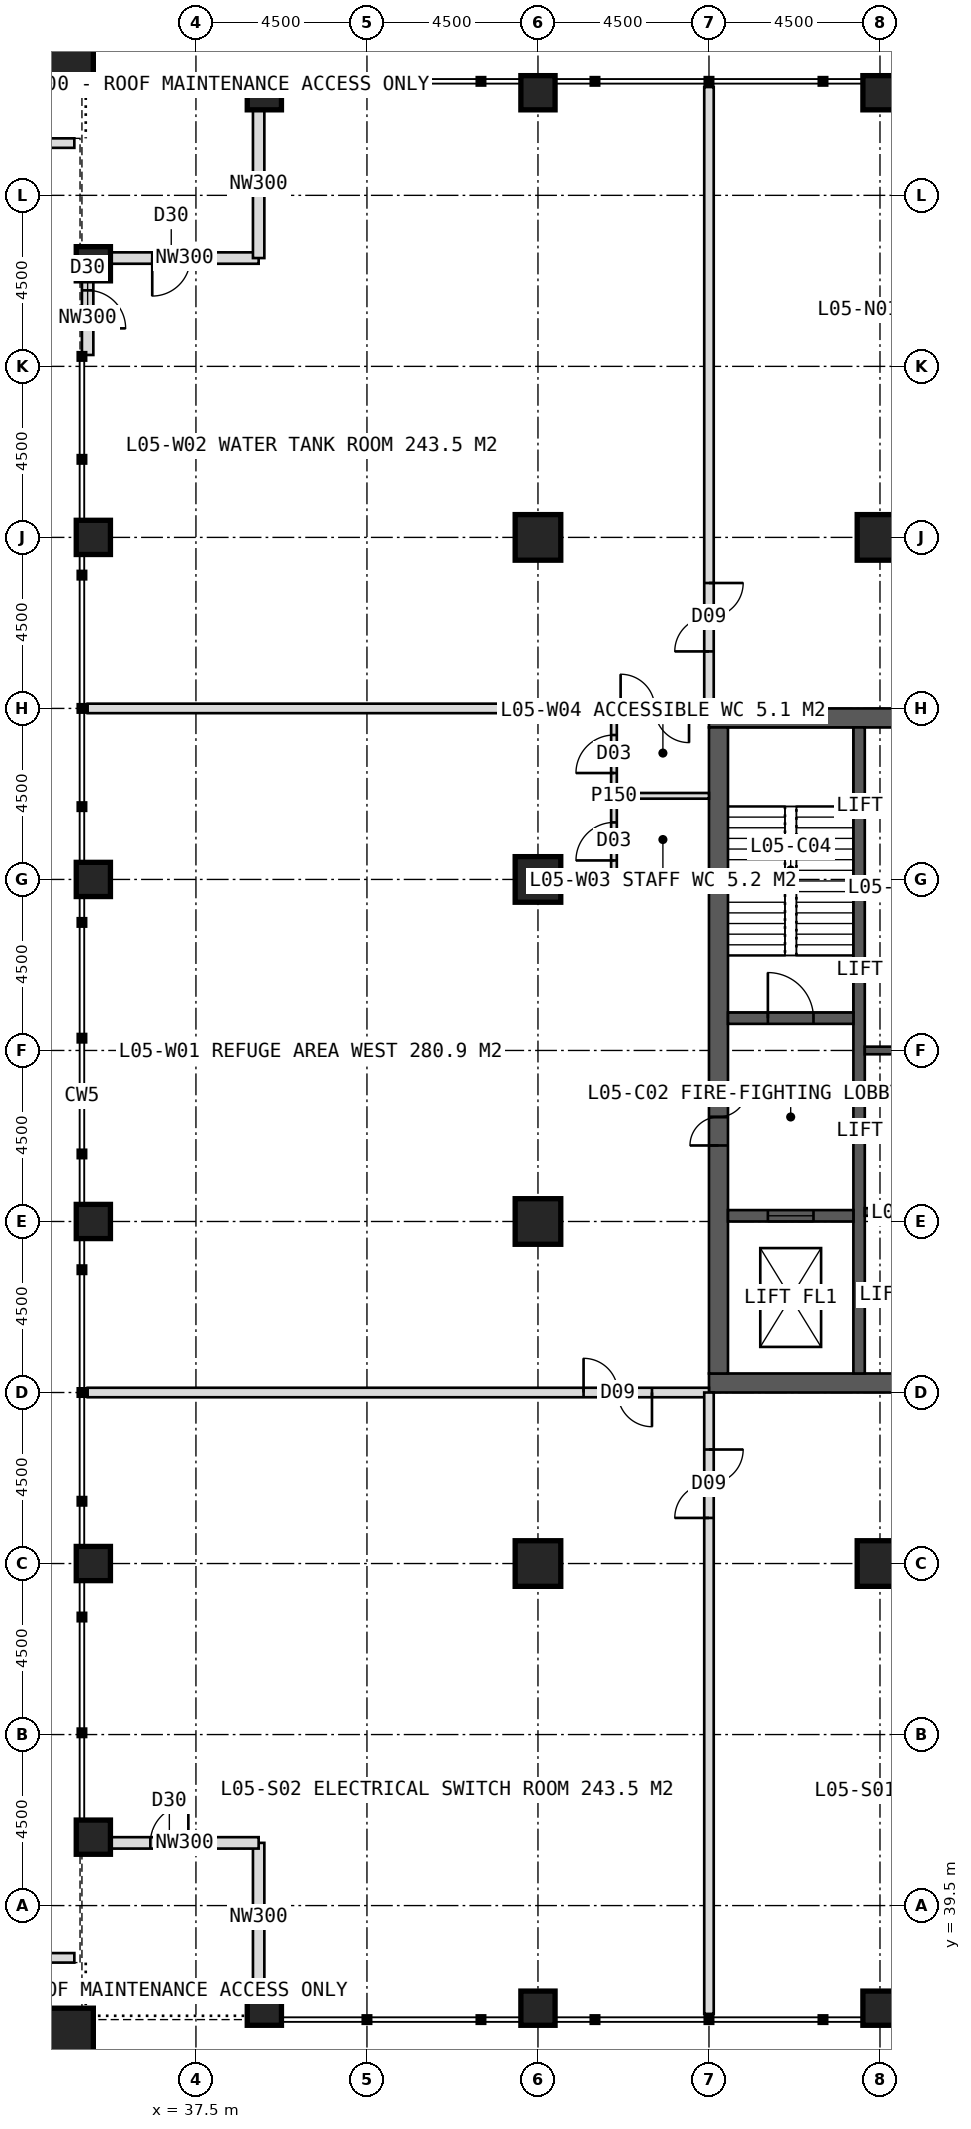
"""IFC4 building model, lengths in metres.
Left out: names, types, materials, properties, quantities, classifications, styles, units other than length and angle.
Written with IfcOpenShell. Run it as: python <this file> out.ifc"""

import sys

from ifc_helpers import new_model, si_unit, direction, frame, frame_2d, origin, origin_2d, place, context, subcontext, project, spatial, rectangle, hollow_rectangle, extrude, element, fill, save


model = new_model("IFC4")
c1 = context("Model", 3, precision=1e-05, world=origin(), true_north=direction((0.0, 1.0)))
c2 = subcontext(c1, "Body", "Model", "MODEL_VIEW")
j1 = project(units=[si_unit("LENGTHUNIT", "METRE"), si_unit("PLANEANGLEUNIT", "RADIAN")], contexts=[c1])
p1 = place(None, origin())
s1 = spatial("IfcSite", under=j1, at=p1, CompositionType="ELEMENT")
p2 = place(p1, origin())
s2 = spatial("IfcBuilding", under=s1, at=p2, CompositionType="ELEMENT")
p3 = place(p2, frame((0.0, 0.0, 26.0)))
s3 = spatial("IfcBuildingStorey", under=s2, at=p3, CompositionType="ELEMENT", Elevation=26.0)
p4 = place(p3, frame((51.0, 70.75, 0.0), z_axis=(0.0, 0.0, 1.0), x_axis=(1.0, 0.0, 0.0)))
e1 = element("IfcWall", 1, at=p4, inside=s3, PredefinedType="SHEAR", context=c2, shape_type="SweptSolid", body=[
    extrude(rectangle(XDim=18.0, YDim=0.5, at=frame_2d((9.0, 0.0))), origin(), (0.0, 0.0, 1.0), 5.0),
])
p5 = place(p4, frame((8.1, 0.0, 0.0)))
e2 = element("IfcOpeningElement", 2, at=p5, cuts=e1, PredefinedType="OPENING", context=c2, shape_type="SweptSolid", body=[
    extrude(rectangle(XDim=1.8, YDim=2.2, at=frame_2d((0.9, 1.1))), frame((0.0, 0.26, 0.0), z_axis=(0.0, -1.0, 0.0), x_axis=(1.0, 0.0, 0.0)), (0.0, 0.0, 1.0), 0.52),
])
p6 = place(p3, frame((51.0, 53.25, 0.0), z_axis=(0.0, 0.0, 1.0), x_axis=(1.0, 0.0, 0.0)))
e3 = element("IfcWall", 3, at=p6, inside=s3, PredefinedType="SHEAR", context=c2, shape_type="SweptSolid", body=[
    extrude(rectangle(XDim=18.0, YDim=0.5, at=frame_2d((9.0, 0.0))), origin(), (0.0, 0.0, 1.0), 5.0),
])
p7 = place(p6, frame((8.1, 0.0, 0.0)))
e4 = element("IfcOpeningElement", 4, at=p7, cuts=e3, PredefinedType="OPENING", context=c2, shape_type="SweptSolid", body=[
    extrude(rectangle(XDim=1.8, YDim=2.2, at=frame_2d((0.9, 1.1))), frame((0.0, 0.26, 0.0), z_axis=(0.0, -1.0, 0.0), x_axis=(1.0, 0.0, 0.0)), (0.0, 0.0, 1.0), 0.52),
])
p8 = place(p3, frame((51.25, 53.5, 0.0), z_axis=(0.0, 0.0, 1.0), x_axis=(0.0, 1.0, 0.0)))
e5 = element("IfcWall", 5, at=p8, inside=s3, PredefinedType="SHEAR", context=c2, shape_type="SweptSolid", body=[
    extrude(rectangle(XDim=17.0, YDim=0.5, at=frame_2d((8.5, 0.0))), origin(), (0.0, 0.0, 1.0), 5.0),
])
p9 = place(p8, frame((6.0, 0.0, 0.0)))
e6 = element("IfcOpeningElement", 6, at=p9, cuts=e5, PredefinedType="OPENING", context=c2, shape_type="SweptSolid", body=[
    extrude(rectangle(XDim=1.5, YDim=2.2, at=frame_2d((0.75, 1.1))), frame((0.0, 0.26, 0.0), z_axis=(0.0, -1.0, 0.0), x_axis=(1.0, 0.0, 0.0)), (0.0, 0.0, 1.0), 0.52),
])
p10 = place(p3, frame((54.95, 53.5, 0.0), z_axis=(0.0, 0.0, 1.0), x_axis=(0.0, 1.0, 0.0)))
e7 = element("IfcWall", 7, at=p10, inside=s3, PredefinedType="SHEAR", context=c2, shape_type="SweptSolid", body=[
    extrude(rectangle(XDim=17.0, YDim=0.3, at=frame_2d((8.5, 0.0))), origin(), (0.0, 0.0, 1.0), 5.0),
])
for number, where, z_axis, x_axis in (
    (8, (55.1, 57.75, 0.0), (0.0, 0.0, 1.0), (1.0, 0.0, 0.0)),
    (9, (55.1, 62.0, 0.0), (0.0, 0.0, 1.0), (1.0, 0.0, 0.0)),
    (10, (55.1, 66.25, 0.0), (0.0, 0.0, 1.0), (1.0, 0.0, 0.0)),
):
    element("IfcWall", number, at=place(p3, frame(where, z_axis=z_axis, x_axis=x_axis)), inside=s3, PredefinedType="SHEAR", context=c2, shape_type="SweptSolid", body=[
        extrude(rectangle(XDim=3.05, YDim=0.2, at=frame_2d((1.525, 0.0))), origin(), (0.0, 0.0, 1.0), 5.0),
    ])
p11 = place(p3, frame((51.5, 62.85, 0.0), z_axis=(0.0, 0.0, 1.0), x_axis=(1.0, 0.0, 0.0)))
e11 = element("IfcWall", 11, at=p11, inside=s3, PredefinedType="SHEAR", context=c2, shape_type="SweptSolid", body=[
    extrude(rectangle(XDim=3.3, YDim=0.3, at=frame_2d((1.65, 0.0))), origin(), (0.0, 0.0, 1.0), 5.0),
])
p12 = place(p11, frame((1.05, 0.0, 0.0)))
e12 = element("IfcOpeningElement", 12, at=p12, cuts=e11, PredefinedType="OPENING", context=c2, shape_type="SweptSolid", body=[
    extrude(rectangle(XDim=1.2, YDim=2.1, at=frame_2d((0.6, 1.05))), frame((0.0, 0.16, 0.0), z_axis=(0.0, -1.0, 0.0), x_axis=(1.0, 0.0, 0.0)), (0.0, 0.0, 1.0), 0.32),
])
p13 = place(p3, frame((51.5, 57.65, 0.0), z_axis=(0.0, 0.0, 1.0), x_axis=(1.0, 0.0, 0.0)))
e13 = element("IfcWall", 13, at=p13, inside=s3, PredefinedType="SHEAR", context=c2, shape_type="SweptSolid", body=[
    extrude(rectangle(XDim=3.3, YDim=0.3, at=frame_2d((1.65, 0.0))), origin(), (0.0, 0.0, 1.0), 5.0),
])
p14 = place(p13, frame((1.05, 0.0, 0.0)))
e14 = element("IfcOpeningElement", 14, at=p14, cuts=e13, PredefinedType="OPENING", context=c2, shape_type="SweptSolid", body=[
    extrude(rectangle(XDim=1.2, YDim=2.2, at=frame_2d((0.6, 1.1))), frame((0.0, 0.16, 0.0), z_axis=(0.0, -1.0, 0.0), x_axis=(1.0, 0.0, 0.0)), (0.0, 0.0, 1.0), 0.32),
])
for number, where, z_axis, x_axis in (
    (15, (46.5, 48.5, 0.0), (0.0, 0.0, 1.0), (1.0, 0.0, 0.0)),
    (16, (46.5, 75.5, 0.0), (0.0, 0.0, 1.0), (1.0, 0.0, 0.0)),
    (17, (55.5, 48.5, 0.0), (0.0, 0.0, 1.0), (1.0, 0.0, 0.0)),
    (18, (55.5, 75.5, 0.0), (0.0, 0.0, 1.0), (1.0, 0.0, 0.0)),
    (19, (46.5, 57.5, 0.0), (0.0, 0.0, 1.0), (1.0, 0.0, 0.0)),
    (20, (46.5, 66.5, 0.0), (0.0, 0.0, 1.0), (1.0, 0.0, 0.0)),
):
    element("IfcColumn", number, at=place(p3, frame(where, z_axis=z_axis, x_axis=x_axis)), inside=s3, PredefinedType="COLUMN", context=c2, shape_type="SweptSolid", body=[
        extrude(hollow_rectangle(XDim=1.2, YDim=1.2, WallThickness=0.1, at=origin_2d()), origin(), (0.0, 0.0, 1.0), 5.0),
    ])
for number, where, z_axis, x_axis in (
    (21, (39.3, 36.8, 0.0), (0.0, 0.0, 1.0), (1.0, 0.0, 0.0)),
    (22, (39.3, 87.2, 0.0), (0.0, 0.0, 1.0), (1.0, 0.0, 0.0)),
    (23, (34.8, 41.3, 0.0), (0.0, 0.0, 1.0), (1.0, 0.0, 0.0)),
    (24, (46.5, 36.8, 0.0), (0.0, 0.0, 1.0), (1.0, 0.0, 0.0)),
    (25, (46.5, 87.2, 0.0), (0.0, 0.0, 1.0), (1.0, 0.0, 0.0)),
    (26, (34.8, 48.5, 0.0), (0.0, 0.0, 1.0), (1.0, 0.0, 0.0)),
    (27, (55.5, 36.8, 0.0), (0.0, 0.0, 1.0), (1.0, 0.0, 0.0)),
    (28, (55.5, 87.2, 0.0), (0.0, 0.0, 1.0), (1.0, 0.0, 0.0)),
    (29, (34.8, 57.5, 0.0), (0.0, 0.0, 1.0), (1.0, 0.0, 0.0)),
    (30, (34.8, 66.5, 0.0), (0.0, 0.0, 1.0), (1.0, 0.0, 0.0)),
    (31, (34.8, 75.5, 0.0), (0.0, 0.0, 1.0), (1.0, 0.0, 0.0)),
    (32, (34.8, 82.7, 0.0), (0.0, 0.0, 1.0), (1.0, 0.0, 0.0)),
):
    element("IfcColumn", number, at=place(p3, frame(where, z_axis=z_axis, x_axis=x_axis)), inside=s3, PredefinedType="COLUMN", context=c2, shape_type="SweptSolid", body=[
        extrude(hollow_rectangle(XDim=0.9, YDim=0.9, WallThickness=0.08, at=origin_2d()), origin(), (0.0, 0.0, 1.0), 5.0),
    ])
for number, where, z_axis, x_axis in (
    (33, (33.9, 35.9, 0.0), (0.0, 0.0, 1.0), (1.0, 0.0, 0.0)),
    (34, (33.9, 88.1, 0.0), (0.0, 0.0, 1.0), (1.0, 0.0, 0.0)),
):
    element("IfcColumn", number, at=place(p3, frame(where, z_axis=z_axis, x_axis=x_axis)), inside=s3, PredefinedType="COLUMN", context=c2, shape_type="SweptSolid", body=[
        extrude(hollow_rectangle(XDim=1.8, YDim=1.8, WallThickness=0.1, at=origin_2d()), origin(), (0.0, 0.0, 1.0), 5.0),
    ])
p15 = place(p3, frame((34.65, 80.3, 0.0), z_axis=(0.0, 0.0, 1.0), x_axis=(0.0, 1.0, 0.0)))
e35 = element("IfcWall", 35, at=p15, inside=s3, PredefinedType="ELEMENTEDWALL", context=c2, shape_type="SweptSolid", body=[
    extrude(rectangle(XDim=1.95, YDim=0.3, at=frame_2d((0.975, 0.0))), origin(), (0.0, 0.0, 1.0), 4.25),
])
p16 = place(p15, frame((0.7, 0.0, 0.0)))
e36 = element("IfcOpeningElement", 36, at=p16, cuts=e35, PredefinedType="OPENING", context=c2, shape_type="SweptSolid", body=[
    extrude(rectangle(XDim=1.0, YDim=2.1, at=frame_2d((0.5, 1.05))), frame((0.0, 0.16, 0.0), z_axis=(0.0, -1.0, 0.0), x_axis=(1.0, 0.0, 0.0)), (0.0, 0.0, 1.0), 0.32),
])
p17 = place(p3, frame((35.25, 82.85, 0.0), z_axis=(0.0, 0.0, 1.0), x_axis=(1.0, 0.0, 0.0)))
e37 = element("IfcWall", 37, at=p17, inside=s3, PredefinedType="ELEMENTEDWALL", context=c2, shape_type="SweptSolid", body=[
    extrude(rectangle(XDim=3.9, YDim=0.3, at=frame_2d((1.95, 0.0))), origin(), (0.0, 0.0, 1.0), 3.95),
])
p18 = place(p17, frame((1.1, 0.0, 0.0)))
e38 = element("IfcOpeningElement", 38, at=p18, cuts=e37, PredefinedType="OPENING", context=c2, shape_type="SweptSolid", body=[
    extrude(rectangle(XDim=1.0, YDim=2.1, at=frame_2d((0.5, 1.05))), frame((0.0, 0.16, 0.0), z_axis=(0.0, -1.0, 0.0), x_axis=(1.0, 0.0, 0.0)), (0.0, 0.0, 1.0), 0.32),
])
for number, where, z_axis, x_axis in (
    (39, (39.15, 82.85, 0.0), (0.0, 0.0, 1.0), (0.0, 1.0, 0.0)),
    (40, (39.15, 37.25, 0.0), (0.0, 0.0, 1.0), (0.0, 1.0, 0.0)),
):
    element("IfcWall", number, at=place(p3, frame(where, z_axis=z_axis, x_axis=x_axis)), inside=s3, PredefinedType="ELEMENTEDWALL", context=c2, shape_type="SweptSolid", body=[
        extrude(rectangle(XDim=3.9, YDim=0.3, at=frame_2d((1.95, 0.0))), origin(), (0.0, 0.0, 1.0), 3.95),
    ])
p19 = place(p3, frame((39.15, 41.15, 0.0), z_axis=(0.0, 0.0, 1.0), x_axis=(-1.0, 0.0, 0.0)))
e41 = element("IfcWall", 41, at=p19, inside=s3, PredefinedType="ELEMENTEDWALL", context=c2, shape_type="SweptSolid", body=[
    extrude(rectangle(XDim=3.9, YDim=0.3, at=frame_2d((1.95, 0.0))), origin(), (0.0, 0.0, 1.0), 3.95),
])
p20 = place(p19, frame((1.85, 0.0, 0.0)))
e42 = element("IfcOpeningElement", 42, at=p20, cuts=e41, PredefinedType="OPENING", context=c2, shape_type="SweptSolid", body=[
    extrude(rectangle(XDim=1.0, YDim=2.1, at=frame_2d((0.5, 1.05))), frame((0.0, 0.16, 0.0), z_axis=(0.0, -1.0, 0.0), x_axis=(1.0, 0.0, 0.0)), (0.0, 0.0, 1.0), 0.32),
])
for number, where, z_axis, x_axis in (
    (43, (12.125, 38.125, 0.0), (0.0, 0.0, 1.0), (1.0, 0.0, 0.0)),
    (44, (12.125, 85.875, 0.0), (0.0, 0.0, 1.0), (1.0, 0.0, 0.0)),
):
    element("IfcWall", number, at=place(p3, frame(where, z_axis=z_axis, x_axis=x_axis)), inside=s3, PredefinedType="PARAPET", context=c2, shape_type="SweptSolid", body=[
        extrude(rectangle(XDim=22.175, YDim=0.25, at=frame_2d((11.087, 0.0))), origin(), (0.0, 0.0, 1.0), 1.1),
    ])
p21 = place(p3, frame((51.0, 71.0, 0.0), z_axis=(0.0, 0.0, 1.0), x_axis=(0.0, 1.0, 0.0)))
e45 = element("IfcWall", 45, at=p21, inside=s3, PredefinedType="SOLIDWALL", context=c2, shape_type="SweptSolid", body=[
    extrude(rectangle(XDim=16.35, YDim=0.25, at=frame_2d((8.175, 0.0))), origin(), (0.0, 0.0, 1.0), 4.75),
])
p22 = place(p21, frame((1.5, 0.0, 0.0)))
e46 = element("IfcOpeningElement", 46, at=p22, cuts=e45, PredefinedType="OPENING", context=c2, shape_type="SweptSolid", body=[
    extrude(rectangle(XDim=1.8, YDim=2.2, at=frame_2d((0.9, 1.1))), frame((0.0, 0.135, 0.0), z_axis=(0.0, -1.0, 0.0), x_axis=(1.0, 0.0, 0.0)), (0.0, 0.0, 1.0), 0.27),
])
p23 = place(p3, frame((51.0, 71.0, 0.0), z_axis=(0.0, 0.0, 1.0), x_axis=(-1.0, 0.0, 0.0)))
e47 = element("IfcWall", 47, at=p23, inside=s3, PredefinedType="SOLIDWALL", context=c2, shape_type="SweptSolid", body=[
    extrude(rectangle(XDim=16.35, YDim=0.25, at=frame_2d((8.175, 0.0))), origin(), (0.0, 0.0, 1.0), 4.75),
])
p24 = place(p23, frame((0.525, 0.0, 0.0)))
e48 = element("IfcOpeningElement", 48, at=p24, cuts=e47, PredefinedType="OPENING", context=c2, shape_type="SweptSolid", body=[
    extrude(rectangle(XDim=1.8, YDim=2.2, at=frame_2d((0.9, 1.1))), frame((0.0, 0.135, 0.0), z_axis=(0.0, -1.0, 0.0), x_axis=(1.0, 0.0, 0.0)), (0.0, 0.0, 1.0), 0.27),
])
p25 = place(p3, frame((51.0, 53.0, 0.0), z_axis=(0.0, 0.0, 1.0), x_axis=(-1.0, 0.0, 0.0)))
e49 = element("IfcWall", 49, at=p25, inside=s3, PredefinedType="SOLIDWALL", context=c2, shape_type="SweptSolid", body=[
    extrude(rectangle(XDim=16.35, YDim=0.25, at=frame_2d((8.175, 0.0))), origin(), (0.0, 0.0, 1.0), 4.75),
])
p26 = place(p25, frame((1.5, 0.0, 0.0)))
e50 = element("IfcOpeningElement", 50, at=p26, cuts=e49, PredefinedType="OPENING", context=c2, shape_type="SweptSolid", body=[
    extrude(rectangle(XDim=1.8, YDim=2.2, at=frame_2d((0.9, 1.1))), frame((0.0, 0.135, 0.0), z_axis=(0.0, -1.0, 0.0), x_axis=(1.0, 0.0, 0.0)), (0.0, 0.0, 1.0), 0.27),
])
p27 = place(p3, frame((51.0, 53.0, 0.0), z_axis=(0.0, 0.0, 1.0), x_axis=(0.0, -1.0, 0.0)))
e51 = element("IfcWall", 51, at=p27, inside=s3, PredefinedType="SOLIDWALL", context=c2, shape_type="SweptSolid", body=[
    extrude(rectangle(XDim=16.35, YDim=0.25, at=frame_2d((8.175, 0.0))), origin(), (0.0, 0.0, 1.0), 4.75),
])
p28 = place(p27, frame((1.5, 0.0, 0.0)))
e52 = element("IfcOpeningElement", 52, at=p28, cuts=e51, PredefinedType="OPENING", context=c2, shape_type="SweptSolid", body=[
    extrude(rectangle(XDim=1.8, YDim=2.2, at=frame_2d((0.9, 1.1))), frame((0.0, 0.135, 0.0), z_axis=(0.0, -1.0, 0.0), x_axis=(1.0, 0.0, 0.0)), (0.0, 0.0, 1.0), 0.27),
])
p29 = place(p3, frame((48.5, 66.4, 0.0), z_axis=(0.0, 0.0, 1.0), x_axis=(0.0, 1.0, 0.0)))
e53 = element("IfcWall", 53, at=p29, inside=s3, PredefinedType="PARTITIONING", context=c2, shape_type="SweptSolid", body=[
    extrude(rectangle(XDim=4.6, YDim=0.15, at=frame_2d((2.3, 0.0))), origin(), (0.0, 0.0, 1.0), 4.75),
])
p30 = place(p29, frame((0.6, 0.0, 0.0)))
e54 = element("IfcOpeningElement", 54, at=p30, cuts=e53, PredefinedType="OPENING", context=c2, shape_type="SweptSolid", body=[
    extrude(rectangle(XDim=1.0, YDim=2.1, at=frame_2d((0.5, 1.05))), frame((0.0, 0.085, 0.0), z_axis=(0.0, -1.0, 0.0), x_axis=(1.0, 0.0, 0.0)), (0.0, 0.0, 1.0), 0.17),
])
p31 = place(p29, frame((2.9, 0.0, 0.0)))
e55 = element("IfcOpeningElement", 55, at=p31, cuts=e53, PredefinedType="OPENING", context=c2, shape_type="SweptSolid", body=[
    extrude(rectangle(XDim=1.0, YDim=2.1, at=frame_2d((0.5, 1.05))), frame((0.0, 0.085, 0.0), z_axis=(0.0, -1.0, 0.0), x_axis=(1.0, 0.0, 0.0)), (0.0, 0.0, 1.0), 0.17),
])
p32 = place(p3, frame((51.0, 66.4, 0.0), z_axis=(0.0, 0.0, 1.0), x_axis=(-1.0, 0.0, 0.0)))
e56 = element("IfcWall", 56, at=p32, inside=s3, PredefinedType="PARTITIONING", context=c2, shape_type="SweptSolid", body=[
    extrude(rectangle(XDim=2.5, YDim=0.15, at=frame_2d((1.25, 0.0))), origin(), (0.0, 0.0, 1.0), 2.95),
])
p33 = place(p3, frame((51.0, 68.7, 0.0), z_axis=(0.0, 0.0, 1.0), x_axis=(-1.0, 0.0, 0.0)))
e57 = element("IfcWall", 57, at=p33, inside=s3, PredefinedType="PARTITIONING", context=c2, shape_type="SweptSolid", body=[
    extrude(rectangle(XDim=2.5, YDim=0.15, at=frame_2d((1.25, 0.0))), origin(), (0.0, 0.0, 1.0), 4.75),
])
p34 = place(p22, origin())
e58 = element("IfcDoor", 58, at=p34, inside=s3, OperationType="DOUBLE_DOOR_SINGLE_SWING", PredefinedType="DOOR", context=c2, shape_type="SweptSolid", body=[
    extrude(rectangle(XDim=1.8, YDim=2.2, at=frame_2d((0.9, 1.1))), frame((0.0, 0.025, 0.0), z_axis=(0.0, -1.0, 0.0), x_axis=(1.0, 0.0, 0.0)), (0.0, 0.0, 1.0), 0.05),
])
fill(e46, e58)
p35 = place(p24, origin())
e59 = element("IfcDoor", 59, at=p35, inside=s3, OperationType="DOUBLE_DOOR_SINGLE_SWING", PredefinedType="DOOR", context=c2, shape_type="SweptSolid", body=[
    extrude(rectangle(XDim=1.8, YDim=2.2, at=frame_2d((0.9, 1.1))), frame((0.0, 0.025, 0.0), z_axis=(0.0, -1.0, 0.0), x_axis=(1.0, 0.0, 0.0)), (0.0, 0.0, 1.0), 0.05),
])
fill(e48, e59)
p36 = place(p26, origin())
e60 = element("IfcDoor", 60, at=p36, inside=s3, OperationType="DOUBLE_DOOR_SINGLE_SWING", PredefinedType="DOOR", context=c2, shape_type="SweptSolid", body=[
    extrude(rectangle(XDim=1.8, YDim=2.2, at=frame_2d((0.9, 1.1))), frame((0.0, 0.025, 0.0), z_axis=(0.0, -1.0, 0.0), x_axis=(1.0, 0.0, 0.0)), (0.0, 0.0, 1.0), 0.05),
])
fill(e50, e60)
p37 = place(p28, origin())
e61 = element("IfcDoor", 61, at=p37, inside=s3, OperationType="DOUBLE_DOOR_SINGLE_SWING", PredefinedType="DOOR", context=c2, shape_type="SweptSolid", body=[
    extrude(rectangle(XDim=1.8, YDim=2.2, at=frame_2d((0.9, 1.1))), frame((0.0, 0.025, 0.0), z_axis=(0.0, -1.0, 0.0), x_axis=(1.0, 0.0, 0.0)), (0.0, 0.0, 1.0), 0.05),
])
fill(e52, e61)
p38 = place(p30, origin())
e62 = element("IfcDoor", 62, at=p38, inside=s3, OperationType="SINGLE_SWING_LEFT", PredefinedType="DOOR", context=c2, shape_type="SweptSolid", body=[
    extrude(rectangle(XDim=1.0, YDim=2.1, at=frame_2d((0.5, 1.05))), frame((0.0, 0.025, 0.0), z_axis=(0.0, -1.0, 0.0), x_axis=(1.0, 0.0, 0.0)), (0.0, 0.0, 1.0), 0.05),
])
fill(e54, e62)
p39 = place(p31, origin())
e63 = element("IfcDoor", 63, at=p39, inside=s3, OperationType="SINGLE_SWING_LEFT", PredefinedType="DOOR", context=c2, shape_type="SweptSolid", body=[
    extrude(rectangle(XDim=1.0, YDim=2.1, at=frame_2d((0.5, 1.05))), frame((0.0, 0.025, 0.0), z_axis=(0.0, -1.0, 0.0), x_axis=(1.0, 0.0, 0.0)), (0.0, 0.0, 1.0), 0.05),
])
fill(e55, e63)
p40 = place(p9, origin())
e64 = element("IfcDoor", 64, at=p40, inside=s3, OperationType="DOUBLE_DOOR_SINGLE_SWING", PredefinedType="DOOR", context=c2, shape_type="SweptSolid", body=[
    extrude(rectangle(XDim=1.5, YDim=2.2, at=frame_2d((0.75, 1.1))), frame((0.0, 0.025, 0.0), z_axis=(0.0, -1.0, 0.0), x_axis=(1.0, 0.0, 0.0)), (0.0, 0.0, 1.0), 0.05),
])
fill(e6, e64)
p41 = place(p12, origin())
e65 = element("IfcDoor", 65, at=p41, inside=s3, OperationType="SINGLE_SWING_LEFT", PredefinedType="DOOR", context=c2, shape_type="SweptSolid", body=[
    extrude(rectangle(XDim=1.2, YDim=2.1, at=frame_2d((0.6, 1.05))), frame((0.0, 0.025, 0.0), z_axis=(0.0, -1.0, 0.0), x_axis=(1.0, 0.0, 0.0)), (0.0, 0.0, 1.0), 0.05),
])
fill(e12, e65)
p42 = place(p14, origin())
e66 = element("IfcDoor", 66, at=p42, inside=s3, OperationType="SLIDING_TO_LEFT", PredefinedType="DOOR", context=c2, shape_type="SweptSolid", body=[
    extrude(rectangle(XDim=1.2, YDim=2.2, at=frame_2d((0.6, 1.1))), frame((0.0, 0.025, 0.0), z_axis=(0.0, -1.0, 0.0), x_axis=(1.0, 0.0, 0.0)), (0.0, 0.0, 1.0), 0.05),
])
fill(e14, e66)
p43 = place(p20, frame((1.0, 0.0, 0.0), z_axis=(0.0, 0.0, 1.0), x_axis=(-1.0, 0.0, 0.0)))
e67 = element("IfcDoor", 67, at=p43, inside=s3, OperationType="SINGLE_SWING_RIGHT", PredefinedType="DOOR", context=c2, shape_type="SweptSolid", body=[
    extrude(rectangle(XDim=1.0, YDim=2.1, at=frame_2d((0.5, 1.05))), frame((0.0, 0.025, 0.0), z_axis=(0.0, -1.0, 0.0), x_axis=(1.0, 0.0, 0.0)), (0.0, 0.0, 1.0), 0.05),
])
fill(e42, e67)
p44 = place(p18, frame((1.0, 0.0, 0.0), z_axis=(0.0, 0.0, 1.0), x_axis=(-1.0, 0.0, 0.0)))
e68 = element("IfcDoor", 68, at=p44, inside=s3, OperationType="SINGLE_SWING_RIGHT", PredefinedType="DOOR", context=c2, shape_type="SweptSolid", body=[
    extrude(rectangle(XDim=1.0, YDim=2.1, at=frame_2d((0.5, 1.05))), frame((0.0, 0.025, 0.0), z_axis=(0.0, -1.0, 0.0), x_axis=(1.0, 0.0, 0.0)), (0.0, 0.0, 1.0), 0.05),
])
fill(e38, e68)
p45 = place(p16, frame((1.0, 0.0, 0.0), z_axis=(0.0, 0.0, 1.0), x_axis=(-1.0, 0.0, 0.0)))
e69 = element("IfcDoor", 69, at=p45, inside=s3, OperationType="SINGLE_SWING_RIGHT", PredefinedType="DOOR", context=c2, shape_type="SweptSolid", body=[
    extrude(rectangle(XDim=1.0, YDim=2.1, at=frame_2d((0.5, 1.05))), frame((0.0, 0.025, 0.0), z_axis=(0.0, -1.0, 0.0), x_axis=(1.0, 0.0, 0.0)), (0.0, 0.0, 1.0), 0.05),
])
fill(e36, e69)
save(model, sys.argv[1])
